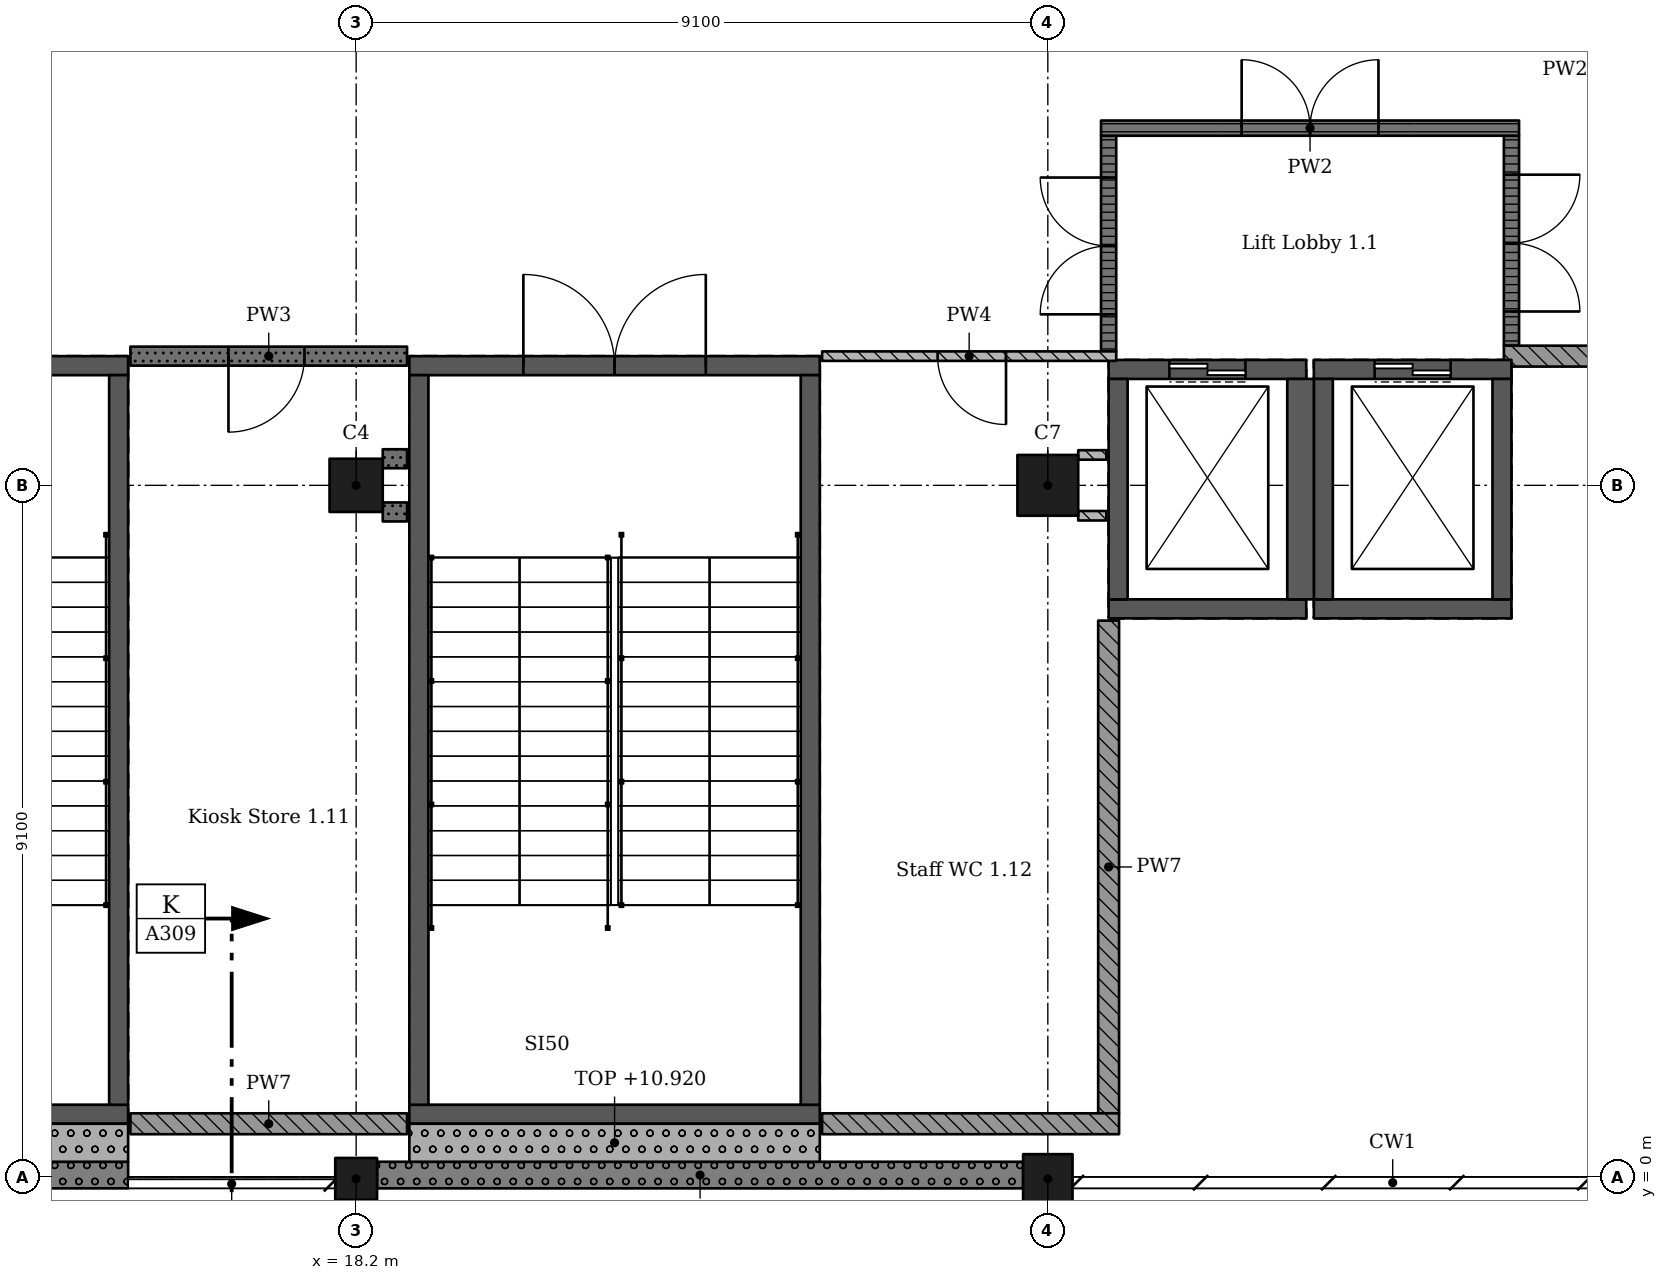
"""IFC4 building model, lengths in metres.
Left out: names, types, materials, properties, quantities, classifications, styles, units other than length and angle.
Written with IfcOpenShell. Run it as: python <this file> out.ifc"""

import sys

from ifc_helpers import new_model, si_unit, direction, frame, frame_2d, origin, origin_2d, place, context, subcontext, project, spatial, rectangle, extrude, element, fill, save


model = new_model("IFC4")
c1 = context("Model", 3, precision=1e-05, world=origin(), true_north=direction((0.0, 1.0)))
c2 = subcontext(c1, "Body", "Model", "MODEL_VIEW")
j1 = project(units=[si_unit("LENGTHUNIT", "METRE"), si_unit("PLANEANGLEUNIT", "RADIAN")], contexts=[c1])
p1 = place(None, origin())
s1 = spatial("IfcSite", under=j1, at=p1, CompositionType="ELEMENT")
p2 = place(p1, origin())
s2 = spatial("IfcBuilding", under=s1, at=p2, CompositionType="ELEMENT")
p3 = place(p2, frame((0.0, 0.0, 6.37)))
s3 = spatial("IfcBuildingStorey", under=s2, at=p3, CompositionType="ELEMENT", Elevation=6.37)
p4 = place(p3, frame((18.2, -0.025, 0.0), z_axis=(0.0, 0.0, 1.0), x_axis=(1.0, 0.0, 0.0)))
e1 = element("IfcColumn", 1, at=p4, inside=s3, PredefinedType="COLUMN", context=c2, shape_type="SweptSolid", body=[
    extrude(rectangle(XDim=0.55, YDim=0.55, at=origin_2d()), origin(), (0.0, 0.0, 1.0), 4.55),
])
p5 = place(p3, frame((18.2, 9.1, 0.0), z_axis=(0.0, 0.0, 1.0), x_axis=(1.0, 0.0, 0.0)))
e2 = element("IfcColumn", 2, at=p5, inside=s3, PredefinedType="COLUMN", context=c2, shape_type="SweptSolid", body=[
    extrude(rectangle(XDim=0.7, YDim=0.7, at=origin_2d()), origin(), (0.0, 0.0, 1.0), 4.55),
])
p6 = place(p3, frame((27.3, -0.025, 0.0), z_axis=(0.0, 0.0, 1.0), x_axis=(1.0, 0.0, 0.0)))
e3 = element("IfcColumn", 3, at=p6, inside=s3, PredefinedType="COLUMN", context=c2, shape_type="SweptSolid", body=[
    extrude(rectangle(XDim=0.65, YDim=0.65, at=origin_2d()), origin(), (0.0, 0.0, 1.0), 4.55),
])
p7 = place(p3, frame((27.3, 9.1, 0.0), z_axis=(0.0, 0.0, 1.0), x_axis=(1.0, 0.0, 0.0)))
e4 = element("IfcColumn", 4, at=p7, inside=s3, PredefinedType="COLUMN", context=c2, shape_type="SweptSolid", body=[
    extrude(rectangle(XDim=0.8, YDim=0.8, at=origin_2d()), origin(), (0.0, 0.0, 1.0), 4.55),
])
p8 = place(p3, frame((30.7, 7.475, 0.0), z_axis=(0.0, 0.0, 1.0), x_axis=(-1.0, 0.0, 0.0)))
e5 = element("IfcWall", 5, at=p8, inside=s3, PredefinedType="SHEAR", context=c2, shape_type="SweptSolid", body=[
    extrude(rectangle(XDim=2.6, YDim=0.25, at=frame_2d((1.3, 0.0))), origin(), (0.0, 0.0, 1.0), 4.55),
])
p9 = place(p3, frame((30.7, 10.625, 0.0), z_axis=(0.0, 0.0, 1.0), x_axis=(-1.0, 0.0, 0.0)))
e6 = element("IfcWall", 6, at=p9, inside=s3, PredefinedType="SHEAR", context=c2, shape_type="SweptSolid", body=[
    extrude(rectangle(XDim=2.6, YDim=0.25, at=frame_2d((1.3, 0.0))), origin(), (0.0, 0.0, 1.0), 4.55),
])
p10 = place(p9, frame((0.8, 0.0, 0.0)))
e7 = element("IfcOpeningElement", 7, at=p10, cuts=e6, PredefinedType="OPENING", context=c2, shape_type="SweptSolid", body=[
    extrude(rectangle(XDim=1.0, YDim=2.1, at=frame_2d((0.5, 1.05))), frame((0.0, 0.135, 0.0), z_axis=(0.0, -1.0, 0.0), x_axis=(1.0, 0.0, 0.0)), (0.0, 0.0, 1.0), 0.27),
])
p11 = place(p3, frame((28.225, 10.5, 0.0), z_axis=(0.0, 0.0, 1.0), x_axis=(0.0, -1.0, 0.0)))
e8 = element("IfcWall", 8, at=p11, inside=s3, PredefinedType="SHEAR", context=c2, shape_type="SweptSolid", body=[
    extrude(rectangle(XDim=2.9, YDim=0.25, at=frame_2d((1.45, 0.0))), origin(), (0.0, 0.0, 1.0), 4.55),
])
p12 = place(p3, frame((30.625, 10.5, 0.0), z_axis=(0.0, 0.0, 1.0), x_axis=(0.0, -1.0, 0.0)))
e9 = element("IfcWall", 9, at=p12, inside=s3, PredefinedType="SHEAR", context=c2, shape_type="SweptSolid", body=[
    extrude(rectangle(XDim=2.9, YDim=0.35, at=frame_2d((1.45, 0.0))), origin(), (0.0, 0.0, 1.0), 4.55),
])
p13 = place(p3, frame((33.4, 7.475, 0.0), z_axis=(0.0, 0.0, 1.0), x_axis=(-1.0, 0.0, 0.0)))
e10 = element("IfcWall", 10, at=p13, inside=s3, PredefinedType="SHEAR", context=c2, shape_type="SweptSolid", body=[
    extrude(rectangle(XDim=2.6, YDim=0.25, at=frame_2d((1.3, 0.0))), origin(), (0.0, 0.0, 1.0), 4.55),
])
p14 = place(p3, frame((33.4, 10.625, 0.0), z_axis=(0.0, 0.0, 1.0), x_axis=(-1.0, 0.0, 0.0)))
e11 = element("IfcWall", 11, at=p14, inside=s3, PredefinedType="SHEAR", context=c2, shape_type="SweptSolid", body=[
    extrude(rectangle(XDim=2.6, YDim=0.25, at=frame_2d((1.3, 0.0))), origin(), (0.0, 0.0, 1.0), 4.55),
])
p15 = place(p14, frame((0.8, 0.0, 0.0)))
e12 = element("IfcOpeningElement", 12, at=p15, cuts=e11, PredefinedType="OPENING", context=c2, shape_type="SweptSolid", body=[
    extrude(rectangle(XDim=1.0, YDim=2.1, at=frame_2d((0.5, 1.05))), frame((0.0, 0.135, 0.0), z_axis=(0.0, -1.0, 0.0), x_axis=(1.0, 0.0, 0.0)), (0.0, 0.0, 1.0), 0.27),
])
for number, where, z_axis, x_axis in (
    (13, (30.925, 10.5, 0.0), (0.0, 0.0, 1.0), (0.0, -1.0, 0.0)),
    (14, (33.275, 10.5, 0.0), (0.0, 0.0, 1.0), (0.0, -1.0, 0.0)),
):
    element("IfcWall", number, at=place(p3, frame(where, z_axis=z_axis, x_axis=x_axis)), inside=s3, PredefinedType="SHEAR", context=c2, shape_type="SweptSolid", body=[
        extrude(rectangle(XDim=2.9, YDim=0.25, at=frame_2d((1.45, 0.0))), origin(), (0.0, 0.0, 1.0), 4.55),
    ])
p16 = place(p3, frame((15.2, 0.825, 0.0), z_axis=(0.0, 0.0, 1.0), x_axis=(-1.0, 0.0, 0.0)))
e15 = element("IfcWall", 15, at=p16, inside=s3, PredefinedType="SHEAR", context=c2, shape_type="SweptSolid", body=[
    extrude(rectangle(XDim=5.4, YDim=0.25, at=frame_2d((2.7, 0.0))), origin(), (0.0, 0.0, 1.0), 4.55),
])
p17 = place(p3, frame((15.2, 10.675, 0.0), z_axis=(0.0, 0.0, 1.0), x_axis=(-1.0, 0.0, 0.0)))
e16 = element("IfcWall", 16, at=p17, inside=s3, PredefinedType="SHEAR", context=c2, shape_type="SweptSolid", body=[
    extrude(rectangle(XDim=5.4, YDim=0.25, at=frame_2d((2.7, 0.0))), origin(), (0.0, 0.0, 1.0), 4.55),
])
p18 = place(p17, frame((1.5, 0.0, 0.0)))
e17 = element("IfcOpeningElement", 17, at=p18, cuts=e16, PredefinedType="OPENING", context=c2, shape_type="SweptSolid", body=[
    extrude(rectangle(XDim=2.4, YDim=2.1, at=frame_2d((1.2, 1.05))), frame((0.0, 0.135, 0.0), z_axis=(0.0, -1.0, 0.0), x_axis=(1.0, 0.0, 0.0)), (0.0, 0.0, 1.0), 0.27),
])
p19 = place(p3, frame((15.075, 10.55, 0.0), z_axis=(0.0, 0.0, 1.0), x_axis=(0.0, -1.0, 0.0)))
e18 = element("IfcWall", 18, at=p19, inside=s3, PredefinedType="SHEAR", context=c2, shape_type="SweptSolid", body=[
    extrude(rectangle(XDim=9.6, YDim=0.25, at=frame_2d((4.8, 0.0))), origin(), (0.0, 0.0, 1.0), 4.55),
])
p20 = place(p3, frame((24.3, 0.825, 0.0), z_axis=(0.0, 0.0, 1.0), x_axis=(-1.0, 0.0, 0.0)))
e19 = element("IfcWall", 19, at=p20, inside=s3, PredefinedType="SHEAR", context=c2, shape_type="SweptSolid", body=[
    extrude(rectangle(XDim=5.4, YDim=0.25, at=frame_2d((2.7, 0.0))), origin(), (0.0, 0.0, 1.0), 4.55),
])
p21 = place(p3, frame((24.3, 10.675, 0.0), z_axis=(0.0, 0.0, 1.0), x_axis=(-1.0, 0.0, 0.0)))
e20 = element("IfcWall", 20, at=p21, inside=s3, PredefinedType="SHEAR", context=c2, shape_type="SweptSolid", body=[
    extrude(rectangle(XDim=5.4, YDim=0.25, at=frame_2d((2.7, 0.0))), origin(), (0.0, 0.0, 1.0), 4.55),
])
p22 = place(p21, frame((1.5, 0.0, 0.0)))
e21 = element("IfcOpeningElement", 21, at=p22, cuts=e20, PredefinedType="OPENING", context=c2, shape_type="SweptSolid", body=[
    extrude(rectangle(XDim=2.4, YDim=2.1, at=frame_2d((1.2, 1.05))), frame((0.0, 0.135, 0.0), z_axis=(0.0, -1.0, 0.0), x_axis=(1.0, 0.0, 0.0)), (0.0, 0.0, 1.0), 0.27),
])
for number, where, z_axis, x_axis in (
    (22, (19.025, 10.55, 0.0), (0.0, 0.0, 1.0), (0.0, -1.0, 0.0)),
    (23, (24.175, 10.55, 0.0), (0.0, 0.0, 1.0), (0.0, -1.0, 0.0)),
):
    element("IfcWall", number, at=place(p3, frame(where, z_axis=z_axis, x_axis=x_axis)), inside=s3, PredefinedType="SHEAR", context=c2, shape_type="SweptSolid", body=[
        extrude(rectangle(XDim=9.6, YDim=0.25, at=frame_2d((4.8, 0.0))), origin(), (0.0, 0.0, 1.0), 4.55),
    ])
p23 = place(p3, frame((9.375, 0.025, 0.0), z_axis=(0.0, 0.0, 1.0), x_axis=(1.0, 0.0, 0.0)))
e24 = element("IfcWall", 24, at=p23, inside=s3, PredefinedType="SOLIDWALL", context=c2, shape_type="SweptSolid", body=[
    extrude(rectangle(XDim=5.825, YDim=0.35, at=frame_2d((2.913, 0.0))), origin(), (0.0, 0.0, 1.0), 3.5),
])
p24 = place(p3, frame((18.475, 0.025, 0.0), z_axis=(0.0, 0.0, 1.0), x_axis=(1.0, 0.0, 0.0)))
e25 = element("IfcWall", 25, at=p24, inside=s3, PredefinedType="SOLIDWALL", context=c2, shape_type="SweptSolid", body=[
    extrude(rectangle(XDim=8.5, YDim=0.35, at=frame_2d((4.25, 0.0))), origin(), (0.0, 0.0, 1.0), 3.5),
])
p25 = place(p3, frame((9.8, 0.45, 0.0), z_axis=(0.0, 0.0, 1.0), x_axis=(1.0, 0.0, 0.0)))
e26 = element("IfcWall", 26, at=p25, inside=s3, PredefinedType="SOLIDWALL", context=c2, shape_type="SweptSolid", body=[
    extrude(rectangle(XDim=5.4, YDim=0.5, at=frame_2d((2.7, 0.0))), origin(), (0.0, 0.0, 1.0), 4.55),
])
p26 = place(p3, frame((18.9, 0.45, 0.0), z_axis=(0.0, 0.0, 1.0), x_axis=(1.0, 0.0, 0.0)))
e27 = element("IfcWall", 27, at=p26, inside=s3, PredefinedType="SOLIDWALL", context=c2, shape_type="SweptSolid", body=[
    extrude(rectangle(XDim=5.4, YDim=0.5, at=frame_2d((2.7, 0.0))), origin(), (0.0, 0.0, 1.0), 4.55),
])
p27 = place(p3, frame((18.55, 8.75, 0.0), z_axis=(0.0, 0.0, 1.0), x_axis=(1.0, 0.0, 0.0)))
e28 = element("IfcWall", 28, at=p27, inside=s3, PredefinedType="SOLIDWALL", context=c2, shape_type="SweptSolid", body=[
    extrude(rectangle(XDim=0.32, YDim=0.25, at=frame_2d((0.16, 0.0))), origin(), (0.0, 0.0, 1.0), 4.25),
])
p28 = place(p3, frame((18.87, 0.7, 0.0), z_axis=(0.0, 0.0, 1.0), x_axis=(-1.0, 0.0, 0.0)))
e29 = element("IfcWall", 29, at=p28, inside=s3, PredefinedType="SOLIDWALL", context=c2, shape_type="SweptSolid", body=[
    extrude(rectangle(XDim=3.64, YDim=0.275, at=frame_2d((1.82, 0.0))), origin(), (0.0, 0.0, 1.0), 4.25),
])
p29 = place(p3, frame((18.87, 9.45, 0.0), z_axis=(0.0, 0.0, 1.0), x_axis=(-1.0, 0.0, 0.0)))
e30 = element("IfcWall", 30, at=p29, inside=s3, PredefinedType="SOLIDWALL", context=c2, shape_type="SweptSolid", body=[
    extrude(rectangle(XDim=0.32, YDim=0.25, at=frame_2d((0.16, 0.0))), origin(), (0.0, 0.0, 1.0), 4.25),
])
p30 = place(p3, frame((18.87, 10.8, 0.0), z_axis=(0.0, 0.0, 1.0), x_axis=(-1.0, 0.0, 0.0)))
e31 = element("IfcWall", 31, at=p30, inside=s3, PredefinedType="SOLIDWALL", context=c2, shape_type="SweptSolid", body=[
    extrude(rectangle(XDim=3.64, YDim=0.25, at=frame_2d((1.82, 0.0))), origin(), (0.0, 0.0, 1.0), 4.25),
])
p31 = place(p30, frame((1.35, 0.0, 0.0)))
e32 = element("IfcOpeningElement", 32, at=p31, cuts=e31, PredefinedType="OPENING", context=c2, shape_type="SweptSolid", body=[
    extrude(rectangle(XDim=1.0, YDim=2.1, at=frame_2d((0.5, 1.05))), frame((0.0, 0.135, 0.0), z_axis=(0.0, -1.0, 0.0), x_axis=(1.0, 0.0, 0.0)), (0.0, 0.0, 1.0), 0.27),
])
for number, where, z_axis, x_axis in (
    (33, (27.7, 8.7, 0.0), (0.0, 0.0, 1.0), (1.0, 0.0, 0.0)),
    (34, (28.07, 9.5, 0.0), (0.0, 0.0, 1.0), (-1.0, 0.0, 0.0)),
):
    element("IfcWall", number, at=place(p3, frame(where, z_axis=z_axis, x_axis=x_axis)), inside=s3, PredefinedType="PARTITIONING", context=c2, shape_type="SweptSolid", body=[
        extrude(rectangle(XDim=0.37, YDim=0.125, at=frame_2d((0.185, 0.0))), origin(), (0.0, 0.0, 1.0), 4.25),
    ])
p32 = place(p3, frame((28.1, 7.32, 0.0), z_axis=(0.0, 0.0, 1.0), x_axis=(0.0, -1.0, 0.0)))
e35 = element("IfcWall", 35, at=p32, inside=s3, PredefinedType="SOLIDWALL", context=c2, shape_type="SweptSolid", body=[
    extrude(rectangle(XDim=6.483, YDim=0.275, at=frame_2d((3.241, 0.0))), origin(), (0.0, 0.0, 1.0), 4.25),
])
p33 = place(p3, frame((28.1, 13.7, 0.0), z_axis=(0.0, 0.0, 1.0), x_axis=(0.0, -1.0, 0.0)))
e36 = element("IfcWall", 36, at=p33, inside=s3, PredefinedType="PARTITIONING", context=c2, shape_type="SweptSolid", body=[
    extrude(rectangle(XDim=2.837, YDim=0.2, at=frame_2d((1.419, 0.0))), origin(), (0.0, 0.0, 1.0), 4.25),
])
p34 = place(p33, frame((0.55, 0.0, 0.0)))
e37 = element("IfcOpeningElement", 37, at=p34, cuts=e36, PredefinedType="OPENING", context=c2, shape_type="SweptSolid", body=[
    extrude(rectangle(XDim=1.8, YDim=2.4, at=frame_2d((0.9, 1.2))), frame((0.0, 0.11, 0.0), z_axis=(0.0, -1.0, 0.0), x_axis=(1.0, 0.0, 0.0)), (0.0, 0.0, 1.0), 0.22),
])
p35 = place(p3, frame((28.2, 10.8, 0.0), z_axis=(0.0, 0.0, 1.0), x_axis=(-1.0, 0.0, 0.0)))
e38 = element("IfcWall", 38, at=p35, inside=s3, PredefinedType="PARTITIONING", context=c2, shape_type="SweptSolid", body=[
    extrude(rectangle(XDim=3.87, YDim=0.125, at=frame_2d((1.935, 0.0))), origin(), (0.0, 0.0, 1.0), 4.25),
])
p36 = place(p35, frame((1.45, 0.0, 0.0)))
e39 = element("IfcOpeningElement", 39, at=p36, cuts=e38, PredefinedType="OPENING", context=c2, shape_type="SweptSolid", body=[
    extrude(rectangle(XDim=0.9, YDim=2.1, at=frame_2d((0.45, 1.05))), frame((0.0, 0.073, 0.0), z_axis=(0.0, -1.0, 0.0), x_axis=(1.0, 0.0, 0.0)), (0.0, 0.0, 1.0), 0.145),
])
p37 = place(p3, frame((28.238, 0.7, 0.0), z_axis=(0.0, 0.0, 1.0), x_axis=(-1.0, 0.0, 0.0)))
e40 = element("IfcWall", 40, at=p37, inside=s3, PredefinedType="SOLIDWALL", context=c2, shape_type="SweptSolid", body=[
    extrude(rectangle(XDim=3.907, YDim=0.275, at=frame_2d((1.954, 0.0))), origin(), (0.0, 0.0, 1.0), 4.25),
])
p38 = place(p3, frame((33.4, 10.938, 0.0), z_axis=(0.0, 0.0, 1.0), x_axis=(0.0, 1.0, 0.0)))
e41 = element("IfcWall", 41, at=p38, inside=s3, PredefinedType="PARTITIONING", context=c2, shape_type="SweptSolid", body=[
    extrude(rectangle(XDim=2.762, YDim=0.2, at=frame_2d((1.381, 0.0))), origin(), (0.0, 0.0, 1.0), 4.25),
])
p39 = place(p38, frame((0.45, 0.0, 0.0)))
e42 = element("IfcOpeningElement", 42, at=p39, cuts=e41, PredefinedType="OPENING", context=c2, shape_type="SweptSolid", body=[
    extrude(rectangle(XDim=1.8, YDim=2.4, at=frame_2d((0.9, 1.2))), frame((0.0, 0.11, 0.0), z_axis=(0.0, -1.0, 0.0), x_axis=(1.0, 0.0, 0.0)), (0.0, 0.0, 1.0), 0.22),
])
p40 = place(p3, frame((33.5, 13.8, 0.0), z_axis=(0.0, 0.0, 1.0), x_axis=(-1.0, 0.0, 0.0)))
e43 = element("IfcWall", 43, at=p40, inside=s3, PredefinedType="PARTITIONING", context=c2, shape_type="SweptSolid", body=[
    extrude(rectangle(XDim=5.5, YDim=0.2, at=frame_2d((2.75, 0.0))), origin(), (0.0, 0.0, 1.0), 4.25),
])
p41 = place(p40, frame((1.85, 0.0, 0.0)))
e44 = element("IfcOpeningElement", 44, at=p41, cuts=e43, PredefinedType="OPENING", context=c2, shape_type="SweptSolid", body=[
    extrude(rectangle(XDim=1.8, YDim=2.4, at=frame_2d((0.9, 1.2))), frame((0.0, 0.11, 0.0), z_axis=(0.0, -1.0, 0.0), x_axis=(1.0, 0.0, 0.0)), (0.0, 0.0, 1.0), 0.22),
])
p42 = place(p3, frame((36.113, 10.8, 0.0), z_axis=(0.0, 0.0, 1.0), x_axis=(-1.0, 0.0, 0.0)))
e45 = element("IfcWall", 45, at=p42, inside=s3, PredefinedType="SOLIDWALL", context=c2, shape_type="SweptSolid", body=[
    extrude(rectangle(XDim=2.812, YDim=0.275, at=frame_2d((1.406, 0.0))), origin(), (0.0, 0.0, 1.0), 4.25),
])
p43 = place(p31, origin())
e46 = element("IfcDoor", 46, at=p43, inside=s3, OperationType="SINGLE_SWING_LEFT", PredefinedType="DOOR", context=c2, shape_type="SweptSolid", body=[
    extrude(rectangle(XDim=1.0, YDim=2.1, at=frame_2d((0.5, 1.05))), frame((0.0, 0.025, 0.0), z_axis=(0.0, -1.0, 0.0), x_axis=(1.0, 0.0, 0.0)), (0.0, 0.0, 1.0), 0.05),
])
fill(e32, e46)
p44 = place(p36, origin())
e47 = element("IfcDoor", 47, at=p44, inside=s3, OperationType="SINGLE_SWING_RIGHT", PredefinedType="DOOR", context=c2, shape_type="SweptSolid", body=[
    extrude(rectangle(XDim=0.9, YDim=2.1, at=frame_2d((0.45, 1.05))), frame((0.0, 0.025, 0.0), z_axis=(0.0, -1.0, 0.0), x_axis=(1.0, 0.0, 0.0)), (0.0, 0.0, 1.0), 0.05),
])
fill(e39, e47)
p45 = place(p41, origin())
e48 = element("IfcDoor", 48, at=p45, inside=s3, OperationType="DOUBLE_DOOR_SINGLE_SWING", PredefinedType="DOOR", context=c2, shape_type="SweptSolid", body=[
    extrude(rectangle(XDim=1.8, YDim=2.4, at=frame_2d((0.9, 1.2))), frame((0.0, 0.025, 0.0), z_axis=(0.0, -1.0, 0.0), x_axis=(1.0, 0.0, 0.0)), (0.0, 0.0, 1.0), 0.05),
])
fill(e44, e48)
p46 = place(p34, origin())
e49 = element("IfcDoor", 49, at=p46, inside=s3, OperationType="DOUBLE_DOOR_SINGLE_SWING", PredefinedType="DOOR", context=c2, shape_type="SweptSolid", body=[
    extrude(rectangle(XDim=1.8, YDim=2.4, at=frame_2d((0.9, 1.2))), frame((0.0, 0.025, 0.0), z_axis=(0.0, -1.0, 0.0), x_axis=(1.0, 0.0, 0.0)), (0.0, 0.0, 1.0), 0.05),
])
fill(e37, e49)
p47 = place(p39, origin())
e50 = element("IfcDoor", 50, at=p47, inside=s3, OperationType="DOUBLE_DOOR_SINGLE_SWING", PredefinedType="DOOR", context=c2, shape_type="SweptSolid", body=[
    extrude(rectangle(XDim=1.8, YDim=2.4, at=frame_2d((0.9, 1.2))), frame((0.0, 0.025, 0.0), z_axis=(0.0, -1.0, 0.0), x_axis=(1.0, 0.0, 0.0)), (0.0, 0.0, 1.0), 0.05),
])
fill(e42, e50)
p48 = place(p22, origin())
e51 = element("IfcDoor", 51, at=p48, inside=s3, OperationType="DOUBLE_DOOR_SINGLE_SWING", PredefinedType="DOOR", context=c2, shape_type="SweptSolid", body=[
    extrude(rectangle(XDim=2.4, YDim=2.1, at=frame_2d((1.2, 1.05))), frame((0.0, 0.025, 0.0), z_axis=(0.0, -1.0, 0.0), x_axis=(1.0, 0.0, 0.0)), (0.0, 0.0, 1.0), 0.05),
])
fill(e21, e51)
p49 = place(p10, origin())
e52 = element("IfcDoor", 52, at=p49, inside=s3, OperationType="DOUBLE_DOOR_SLIDING", PredefinedType="DOOR", context=c2, shape_type="SweptSolid", body=[
    extrude(rectangle(XDim=1.0, YDim=2.1, at=frame_2d((0.5, 1.05))), frame((0.0, 0.025, 0.0), z_axis=(0.0, -1.0, 0.0), x_axis=(1.0, 0.0, 0.0)), (0.0, 0.0, 1.0), 0.05),
])
fill(e7, e52)
p50 = place(p15, origin())
e53 = element("IfcDoor", 53, at=p50, inside=s3, OperationType="DOUBLE_DOOR_SLIDING", PredefinedType="DOOR", context=c2, shape_type="SweptSolid", body=[
    extrude(rectangle(XDim=1.0, YDim=2.1, at=frame_2d((0.5, 1.05))), frame((0.0, 0.025, 0.0), z_axis=(0.0, -1.0, 0.0), x_axis=(1.0, 0.0, 0.0)), (0.0, 0.0, 1.0), 0.05),
])
fill(e12, e53)
save(model, sys.argv[1])
